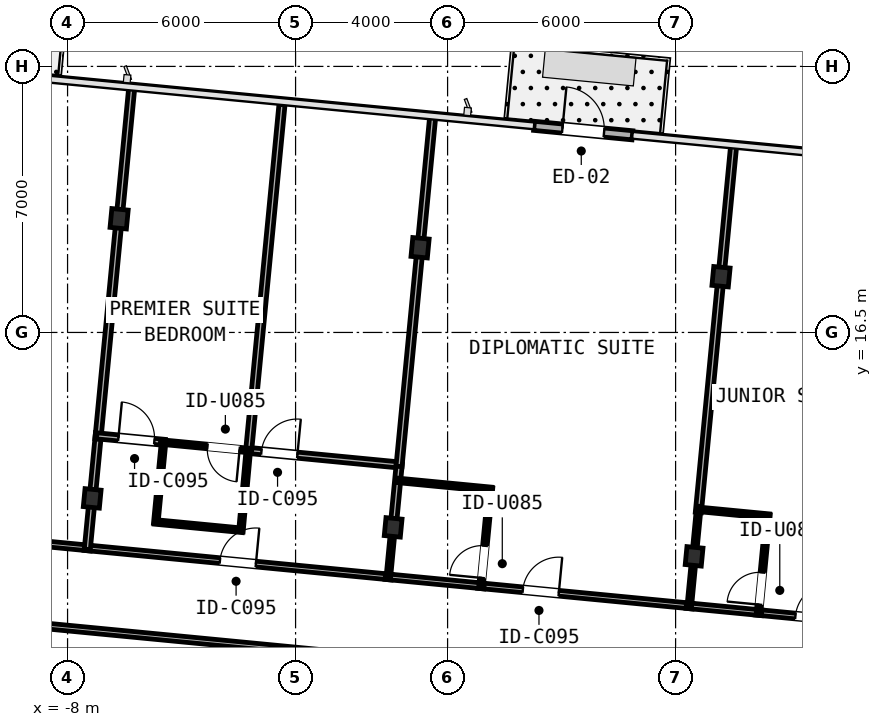
"""IFC4 building model, lengths in metres.
Left out: names, types, materials, properties, quantities, classifications, styles, units other than length and angle.
Written with IfcOpenShell. Run it as: python <this file> out.ifc"""

import sys

from ifc_helpers import new_model, si_unit, direction, frame, frame_2d, origin, origin_2d, place, context, subcontext, project, spatial, rectangle, i_section, extrude, element, fill, save


model = new_model("IFC4")
c1 = context("Model", 3, precision=1e-05, world=origin(), true_north=direction((0.0, 1.0)))
c2 = subcontext(c1, "Body", "Model", "MODEL_VIEW")
j1 = project(units=[si_unit("LENGTHUNIT", "METRE"), si_unit("PLANEANGLEUNIT", "RADIAN")], contexts=[c1])
p1 = place(None, origin())
s1 = spatial("IfcSite", under=j1, at=p1, CompositionType="ELEMENT")
p2 = place(p1, origin())
s2 = spatial("IfcBuilding", under=s1, at=p2, CompositionType="ELEMENT")
p3 = place(p2, frame((0.0, 0.0, 146.25)))
s3 = spatial("IfcBuildingStorey", under=s2, at=p3, CompositionType="ELEMENT", Elevation=146.25)
p4 = place(p3, frame((-7.352, 12.134, 0.0), z_axis=(0.0, 0.0, 1.0), x_axis=(0.995396198367, -0.09584575252, 0.0)))
e1 = element("IfcColumn", 1, at=p4, inside=s3, PredefinedType="COLUMN", context=c2, shape_type="SweptSolid", body=[
    extrude(i_section(OverallWidth=0.424, OverallDepth=0.474, WebThickness=0.048, FlangeThickness=0.077, FilletRadius=0.031, at=origin_2d()), origin(), (0.0, 0.0, 1.0), 3.45),
])
p5 = place(p3, frame((-6.643, 19.492, 0.0), z_axis=(0.0, 0.0, 1.0), x_axis=(0.995396198367, -0.09584575252, 0.0)))
e2 = element("IfcColumn", 2, at=p5, inside=s3, PredefinedType="COLUMN", context=c2, shape_type="SweptSolid", body=[
    extrude(i_section(OverallWidth=0.432, OverallDepth=0.498, WebThickness=0.056, FlangeThickness=0.089, FilletRadius=0.031, at=origin_2d()), origin(), (0.0, 0.0, 1.0), 3.45),
])
p6 = place(p3, frame((0.568, 11.371, 0.0), z_axis=(0.0, 0.0, 1.0), x_axis=(0.995396198367, -0.09584575252, 0.0)))
e3 = element("IfcColumn", 3, at=p6, inside=s3, PredefinedType="COLUMN", context=c2, shape_type="SweptSolid", body=[
    extrude(i_section(OverallWidth=0.424, OverallDepth=0.474, WebThickness=0.048, FlangeThickness=0.077, FilletRadius=0.031, at=origin_2d()), origin(), (0.0, 0.0, 1.0), 3.45),
])
p7 = place(p3, frame((1.276, 18.729, 0.0), z_axis=(0.0, 0.0, 1.0), x_axis=(0.995396198367, -0.09584575252, 0.0)))
e4 = element("IfcColumn", 4, at=p7, inside=s3, PredefinedType="COLUMN", context=c2, shape_type="SweptSolid", body=[
    extrude(i_section(OverallWidth=0.432, OverallDepth=0.498, WebThickness=0.056, FlangeThickness=0.089, FilletRadius=0.031, at=origin_2d()), origin(), (0.0, 0.0, 1.0), 3.45),
])
p8 = place(p3, frame((8.487, 10.609, 0.0), z_axis=(0.0, 0.0, 1.0), x_axis=(0.995396198367, -0.09584575252, 0.0)))
e5 = element("IfcColumn", 5, at=p8, inside=s3, PredefinedType="COLUMN", context=c2, shape_type="SweptSolid", body=[
    extrude(i_section(OverallWidth=0.424, OverallDepth=0.474, WebThickness=0.048, FlangeThickness=0.077, FilletRadius=0.031, at=origin_2d()), origin(), (0.0, 0.0, 1.0), 3.45),
])
p9 = place(p3, frame((9.195, 17.967, 0.0), z_axis=(0.0, 0.0, 1.0), x_axis=(0.995396198367, -0.09584575252, 0.0)))
e6 = element("IfcColumn", 6, at=p9, inside=s3, PredefinedType="COLUMN", context=c2, shape_type="SweptSolid", body=[
    extrude(i_section(OverallWidth=0.432, OverallDepth=0.498, WebThickness=0.056, FlangeThickness=0.089, FilletRadius=0.031, at=origin_2d()), origin(), (0.0, 0.0, 1.0), 3.45),
])
p10 = place(p3, frame((4.275, 21.937, 0.0), z_axis=(0.0, 0.0, 1.0), x_axis=(0.995394049959, -0.095868061976, 0.0)))
e7 = element("IfcWall", 7, at=p10, inside=s3, PredefinedType="STANDARD", context=c2, shape_type="SweptSolid", body=[
    extrude(rectangle(XDim=2.6, YDim=0.24, at=frame_2d((1.3, 0.0))), origin(), (0.0, 0.0, 1.0), 3.19),
])
p11 = place(p10, frame((0.75, 0.0, 0.0)))
e8 = element("IfcOpeningElement", 8, at=p11, cuts=e7, PredefinedType="OPENING", context=c2, shape_type="SweptSolid", body=[
    extrude(rectangle(XDim=1.1, YDim=2.15, at=frame_2d((0.55, 1.075))), frame((0.0, 0.13, 0.0), z_axis=(0.0, -1.0, 0.0), x_axis=(1.0, 0.0, 0.0)), (0.0, 0.0, 1.0), 0.26),
])
p12 = place(p3, frame((-13.04, 11.367, 0.0), z_axis=(0.0, 0.0, 1.0), x_axis=(0.995396240334, -0.095845316679, 0.0)))
e9 = element("IfcWall", 9, at=p12, inside=s3, PredefinedType="PARTITIONING", context=c2, shape_type="SweptSolid", body=[
    extrude(rectangle(XDim=5.67, YDim=0.15, at=frame_2d((2.835, 0.0))), origin(), (0.0, 0.0, 1.0), 2.479),
])
p13 = place(p12, frame((1.186, 0.0, 0.0)))
e10 = element("IfcOpeningElement", 10, at=p13, cuts=e9, PredefinedType="OPENING", context=c2, shape_type="SweptSolid", body=[
    extrude(rectangle(XDim=0.95, YDim=2.15, at=frame_2d((0.475, 1.075))), frame((0.0, 0.085, 0.0), z_axis=(0.0, -1.0, 0.0), x_axis=(1.0, 0.0, 0.0)), (0.0, 0.0, 1.0), 0.17),
])
p14 = place(p3, frame((-7.559, 10.84, 0.0), z_axis=(0.0, 0.0, 1.0), x_axis=(0.995395467524, -0.095853342309, 0.0)))
e11 = element("IfcWall", 11, at=p14, inside=s3, PredefinedType="PARTITIONING", context=c2, shape_type="SweptSolid", body=[
    extrude(rectangle(XDim=8.12, YDim=0.15, at=frame_2d((4.06, 0.0))), origin(), (0.0, 0.0, 1.0), 2.479),
])
p15 = place(p14, frame((3.585, 0.0, 0.0)))
e12 = element("IfcOpeningElement", 12, at=p15, cuts=e11, PredefinedType="OPENING", context=c2, shape_type="SweptSolid", body=[
    extrude(rectangle(XDim=0.95, YDim=2.15, at=frame_2d((0.475, 1.075))), frame((0.0, 0.085, 0.0), z_axis=(0.0, -1.0, 0.0), x_axis=(1.0, 0.0, 0.0)), (0.0, 0.0, 1.0), 0.17),
])
p16 = place(p3, frame((2.799, 9.842, 0.0), z_axis=(0.0, 0.0, 1.0), x_axis=(0.995395844771, -0.095849424686, 0.0)))
e13 = element("IfcWall", 13, at=p16, inside=s3, PredefinedType="PARTITIONING", context=c2, shape_type="SweptSolid", body=[
    extrude(rectangle(XDim=5.67, YDim=0.15, at=frame_2d((2.835, 0.0))), origin(), (0.0, 0.0, 1.0), 2.479),
])
p17 = place(p16, frame((1.186, 0.0, 0.0)))
e14 = element("IfcOpeningElement", 14, at=p17, cuts=e13, PredefinedType="OPENING", context=c2, shape_type="SweptSolid", body=[
    extrude(rectangle(XDim=0.95, YDim=2.15, at=frame_2d((0.475, 1.075))), frame((0.0, 0.085, 0.0), z_axis=(0.0, -1.0, 0.0), x_axis=(1.0, 0.0, 0.0)), (0.0, 0.0, 1.0), 0.17),
])
p18 = place(p3, frame((0.361, 10.077, 0.0), z_axis=(0.0, 0.0, 1.0), x_axis=(0.995397556197, -0.095831649869, 0.0)))
e15 = element("IfcWall", 15, at=p18, inside=s3, PredefinedType="PARTITIONING", context=c2, shape_type="SweptSolid", body=[
    extrude(rectangle(XDim=2.614, YDim=0.15, at=frame_2d((1.307, 0.0))), origin(), (0.0, 0.0, 1.0), 2.479),
])
p19 = place(p3, frame((10.101, 9.139, 0.0), z_axis=(0.0, 0.0, 1.0), x_axis=(0.995393345625, -0.095875374756, 0.0)))
e16 = element("IfcWall", 16, at=p19, inside=s3, PredefinedType="PARTITIONING", context=c2, shape_type="SweptSolid", body=[
    extrude(rectangle(XDim=2.312, YDim=0.15, at=frame_2d((1.156, 0.0))), origin(), (0.0, 0.0, 1.0), 2.718),
])
p20 = place(p19, frame((1.056, 0.0, 0.0)))
e17 = element("IfcOpeningElement", 17, at=p20, cuts=e16, PredefinedType="OPENING", context=c2, shape_type="SweptSolid", body=[
    extrude(rectangle(XDim=0.95, YDim=2.15, at=frame_2d((0.475, 1.075))), frame((0.0, 0.085, 0.0), z_axis=(0.0, -1.0, 0.0), x_axis=(1.0, 0.0, 0.0)), (0.0, 0.0, 1.0), 0.17),
])
p21 = place(p3, frame((8.28, 9.314, 0.0), z_axis=(0.0, 0.0, 1.0), x_axis=(0.995393086543, -0.095878064554, 0.0)))
e18 = element("IfcWall", 18, at=p21, inside=s3, PredefinedType="PARTITIONING", context=c2, shape_type="SweptSolid", body=[
    extrude(rectangle(XDim=1.994, YDim=0.15, at=frame_2d((0.997, 0.0))), origin(), (0.0, 0.0, 1.0), 2.479),
])
p22 = place(p3, frame((3.121, 7.651, 0.0), z_axis=(0.0, 0.0, 1.0), x_axis=(-0.995397135603, 0.095836018457, 0.0)))
e19 = element("IfcWall", 19, at=p22, inside=s3, PredefinedType="PARTITIONING", context=c2, shape_type="SweptSolid", body=[
    extrude(rectangle(XDim=18.892, YDim=0.15, at=frame_2d((9.446, 0.0))), origin(), (0.0, 0.0, 1.0), 2.479),
])
p23 = place(p22, frame((14.502, 0.0, 0.0)))
e20 = element("IfcOpeningElement", 20, at=p23, cuts=e19, PredefinedType="OPENING", context=c2, shape_type="SweptSolid", body=[
    extrude(rectangle(XDim=0.95, YDim=2.15, at=frame_2d((0.475, 1.075))), frame((0.0, 0.085, 0.0), z_axis=(0.0, -1.0, 0.0), x_axis=(1.0, 0.0, 0.0)), (0.0, 0.0, 1.0), 0.17),
])
p24 = place(p3, frame((-7.369, 11.958, 0.0), z_axis=(0.0, 0.0, 1.0), x_axis=(-0.095831494917, -0.995397571115, 0.0)))
e21 = element("IfcWall", 21, at=p24, inside=s3, PredefinedType="PARTITIONING", context=c2, shape_type="SweptSolid", body=[
    extrude(rectangle(XDim=1.172, YDim=0.16, at=frame_2d((0.586, 0.0))), origin(), (0.0, 0.0, 1.0), 2.479),
])
p25 = place(p3, frame((-7.186, 13.858, 0.0), z_axis=(0.0, 0.0, 1.0), x_axis=(-0.095867871334, -0.99539406832, 0.0)))
e22 = element("IfcWall", 22, at=p25, inside=s3, PredefinedType="PARTITIONING", context=c2, shape_type="SweptSolid", body=[
    extrude(rectangle(XDim=1.556, YDim=0.16, at=frame_2d((0.778, 0.0))), origin(), (0.0, 0.0, 1.0), 2.479),
])
p26 = place(p3, frame((-6.66, 19.316, 0.0), z_axis=(0.0, 0.0, 1.0), x_axis=(-0.095877964448, -0.995393096185, 0.0)))
e23 = element("IfcWall", 23, at=p26, inside=s3, PredefinedType="PARTITIONING", context=c2, shape_type="SweptSolid", body=[
    extrude(rectangle(XDim=5.648, YDim=0.16, at=frame_2d((2.824, 0.0))), origin(), (0.0, 0.0, 1.0), 2.479),
])
p27 = place(p3, frame((-6.306, 22.995, 0.0), z_axis=(0.0, 0.0, 1.0), x_axis=(-0.095859866796, -0.995394839216, 0.0)))
e24 = element("IfcWall", 24, at=p27, inside=s3, PredefinedType="PARTITIONING", context=c2, shape_type="SweptSolid", body=[
    extrude(rectangle(XDim=3.344, YDim=0.16, at=frame_2d((1.672, 0.0))), origin(), (0.0, 0.0, 1.0), 3.19),
])
p28 = place(p3, frame((-7.233, 13.78, 0.0), z_axis=(0.0, 0.0, 1.0), x_axis=(0.995392932756, -0.095879661139, 0.0)))
e25 = element("IfcWall", 25, at=p28, inside=s3, PredefinedType="PARTITIONING", context=c2, shape_type="SweptSolid", body=[
    extrude(rectangle(XDim=1.808, YDim=0.16, at=frame_2d((0.904, 0.0))), origin(), (0.0, 0.0, 1.0), 2.479),
])
p29 = place(p28, frame((0.574, 0.0, 0.0)))
e26 = element("IfcOpeningElement", 26, at=p29, cuts=e25, PredefinedType="OPENING", context=c2, shape_type="SweptSolid", body=[
    extrude(rectangle(XDim=0.95, YDim=2.15, at=frame_2d((0.475, 1.075))), frame((0.0, 0.09, 0.0), z_axis=(0.0, -1.0, 0.0), x_axis=(1.0, 0.0, 0.0)), (0.0, 0.0, 1.0), 0.18),
])
p30 = place(p3, frame((-3.284, 13.4, 0.0), z_axis=(0.0, 0.0, 1.0), x_axis=(0.995395934192, -0.095848496045, 0.0)))
e27 = element("IfcWall", 27, at=p30, inside=s3, PredefinedType="PARTITIONING", context=c2, shape_type="SweptSolid", body=[
    extrude(rectangle(XDim=4.068, YDim=0.16, at=frame_2d((2.034, 0.0))), origin(), (0.0, 0.0, 1.0), 2.479),
])
p31 = place(p30, frame((0.386, 0.0, 0.0)))
e28 = element("IfcOpeningElement", 28, at=p31, cuts=e27, PredefinedType="OPENING", context=c2, shape_type="SweptSolid", body=[
    extrude(rectangle(XDim=0.95, YDim=2.15, at=frame_2d((0.475, 1.075))), frame((0.0, 0.09, 0.0), z_axis=(0.0, -1.0, 0.0), x_axis=(1.0, 0.0, 0.0)), (0.0, 0.0, 1.0), 0.18),
])
p32 = place(p3, frame((-5.47, 13.65, 0.0), z_axis=(0.0, 0.0, 1.0), x_axis=(-0.095846349626, -0.995396140872, 0.0)))
e29 = element("IfcWall", 29, at=p32, inside=s3, PredefinedType="PARTITIONING", context=c2, shape_type="SweptSolid", body=[
    extrude(rectangle(XDim=2.188, YDim=0.12, at=frame_2d((1.094, 0.0))), origin(), (0.0, 0.0, 1.0), 2.479),
])
p33 = place(p3, frame((-5.716, 11.516, 0.0), z_axis=(0.0, 0.0, 1.0), x_axis=(0.995393658532, -0.095872126059, 0.0)))
e30 = element("IfcWall", 30, at=p33, inside=s3, PredefinedType="PARTITIONING", context=c2, shape_type="SweptSolid", body=[
    extrude(rectangle(XDim=2.33, YDim=0.12, at=frame_2d((1.165, 0.0))), origin(), (0.0, 0.0, 1.0), 2.718),
])
p34 = place(p3, frame((-3.44, 11.257, 0.0), z_axis=(0.0, 0.0, 1.0), x_axis=(0.091159469261, 0.995836307414, 0.0)))
e31 = element("IfcWall", 31, at=p34, inside=s3, PredefinedType="PARTITIONING", context=c2, shape_type="SweptSolid", body=[
    extrude(rectangle(XDim=2.188, YDim=0.12, at=frame_2d((1.094, 0.0))), origin(), (0.0, 0.0, 1.0), 2.479),
])
p35 = place(p3, frame((0.729, 13.053, 0.0), z_axis=(0.0, 0.0, 1.0), x_axis=(-0.095783075571, -0.995402231479, 0.0)))
e32 = element("IfcWall", 32, at=p35, inside=s3, PredefinedType="PARTITIONING", context=c2, shape_type="SweptSolid", body=[
    extrude(rectangle(XDim=1.514, YDim=0.16, at=frame_2d((0.757, 0.0))), origin(), (0.0, 0.0, 1.0), 2.479),
])
p36 = place(p3, frame((0.551, 11.196, 0.0), z_axis=(0.0, 0.0, 1.0), x_axis=(-0.096017994315, -0.995379598328, 0.0)))
e33 = element("IfcWall", 33, at=p36, inside=s3, PredefinedType="PARTITIONING", context=c2, shape_type="SweptSolid", body=[
    extrude(rectangle(XDim=1.172, YDim=0.12, at=frame_2d((0.586, 0.0))), origin(), (0.0, 0.0, 1.0), 2.479),
])
p37 = place(p3, frame((-2.358, 22.495, 0.0), z_axis=(0.0, 0.0, 1.0), x_axis=(-0.095827921947, -0.995397915095, 0.0)))
e34 = element("IfcWall", 34, at=p37, inside=s3, PredefinedType="PARTITIONING", context=c2, shape_type="SweptSolid", body=[
    extrude(rectangle(XDim=9.182, YDim=0.16, at=frame_2d((4.591, 0.0))), origin(), (0.0, 0.0, 1.0), 2.558),
])
p38 = place(p3, frame((-3.194, 13.391, 0.0), z_axis=(0.0, 0.0, 1.0), x_axis=(-0.995388451302, 0.095926174813, 0.0)))
e35 = element("IfcWall", 35, at=p38, inside=s3, PredefinedType="PARTITIONING", context=c2, shape_type="SweptSolid", body=[
    extrude(rectangle(XDim=2.372, YDim=0.12, at=frame_2d((1.186, 0.0))), origin(), (0.0, 0.0, 1.0), 2.718),
])
p39 = place(p38, frame((0.28, 0.0, 0.0)))
e36 = element("IfcOpeningElement", 36, at=p39, cuts=e35, PredefinedType="OPENING", context=c2, shape_type="SweptSolid", body=[
    extrude(rectangle(XDim=0.85, YDim=2.1, at=frame_2d((0.425, 1.05))), frame((0.0, 0.07, 0.0), z_axis=(0.0, -1.0, 0.0), x_axis=(1.0, 0.0, 0.0)), (0.0, 0.0, 1.0), 0.14),
])
p40 = place(p3, frame((1.259, 18.554, 0.0), z_axis=(0.0, 0.0, 1.0), x_axis=(-0.095807834241, -0.995399848753, 0.0)))
e37 = element("IfcWall", 37, at=p40, inside=s3, PredefinedType="PARTITIONING", context=c2, shape_type="SweptSolid", body=[
    extrude(rectangle(XDim=5.606, YDim=0.16, at=frame_2d((2.803, 0.0))), origin(), (0.0, 0.0, 1.0), 2.479),
])
p41 = place(p3, frame((1.613, 22.233, 0.0), z_axis=(0.0, 0.0, 1.0), x_axis=(-0.095787528641, -0.99540180297, 0.0)))
e38 = element("IfcWall", 38, at=p41, inside=s3, PredefinedType="PARTITIONING", context=c2, shape_type="SweptSolid", body=[
    extrude(rectangle(XDim=3.344, YDim=0.16, at=frame_2d((1.672, 0.0))), origin(), (0.0, 0.0, 1.0), 3.19),
])
p42 = place(p3, frame((2.877, 9.794, 0.0), z_axis=(0.0, 0.0, 1.0), x_axis=(0.095891053428, 0.995391835345, 0.0)))
e39 = element("IfcWall", 39, at=p42, inside=s3, PredefinedType="PARTITIONING", context=c2, shape_type="SweptSolid", body=[
    extrude(rectangle(XDim=2.63, YDim=0.12, at=frame_2d((1.315, 0.0))), origin(), (0.0, 0.0, 1.0), 2.479),
])
p43 = place(p42, frame((0.247, 0.0, 0.0)))
e40 = element("IfcOpeningElement", 40, at=p43, cuts=e39, PredefinedType="OPENING", context=c2, shape_type="SweptSolid", body=[
    extrude(rectangle(XDim=0.85, YDim=2.1, at=frame_2d((0.425, 1.05))), frame((0.0, 0.07, 0.0), z_axis=(0.0, -1.0, 0.0), x_axis=(1.0, 0.0, 0.0)), (0.0, 0.0, 1.0), 0.14),
])
p44 = place(p3, frame((3.165, 12.369, 0.0), z_axis=(0.0, 0.0, 1.0), x_axis=(-0.995389028655, 0.095920183663, 0.0)))
e41 = element("IfcWall", 41, at=p44, inside=s3, PredefinedType="PARTITIONING", context=c2, shape_type="SweptSolid", body=[
    extrude(rectangle(XDim=2.53, YDim=0.12, at=frame_2d((1.265, 0.0))), origin(), (0.0, 0.0, 1.0), 2.479),
])
p45 = place(p3, frame((9.178, 17.791, 0.0), z_axis=(0.0, 0.0, 1.0), x_axis=(-0.095826863488, -0.995398016993, 0.0)))
e42 = element("IfcWall", 42, at=p45, inside=s3, PredefinedType="PARTITIONING", context=c2, shape_type="SweptSolid", body=[
    extrude(rectangle(XDim=6.056, YDim=0.16, at=frame_2d((3.028, 0.0))), origin(), (0.0, 0.0, 1.0), 2.479),
])
p46 = place(p3, frame((9.533, 21.47, 0.0), z_axis=(0.0, 0.0, 1.0), x_axis=(-0.095859866796, -0.995394839216, 0.0)))
e43 = element("IfcWall", 43, at=p46, inside=s3, PredefinedType="PARTITIONING", context=c2, shape_type="SweptSolid", body=[
    extrude(rectangle(XDim=3.344, YDim=0.16, at=frame_2d((1.672, 0.0))), origin(), (0.0, 0.0, 1.0), 3.19),
])
p47 = place(p3, frame((8.47, 10.433, 0.0), z_axis=(0.0, 0.0, 1.0), x_axis=(-0.095831494917, -0.995397571115, 0.0)))
e44 = element("IfcWall", 44, at=p47, inside=s3, PredefinedType="PARTITIONING", context=c2, shape_type="SweptSolid", body=[
    extrude(rectangle(XDim=1.172, YDim=0.12, at=frame_2d((0.586, 0.0))), origin(), (0.0, 0.0, 1.0), 2.479),
])
p48 = place(p3, frame((8.614, 11.927, 0.0), z_axis=(0.0, 0.0, 1.0), x_axis=(-0.09590284245, -0.99539069958, 0.0)))
e45 = element("IfcWall", 45, at=p48, inside=s3, PredefinedType="PARTITIONING", context=c2, shape_type="SweptSolid", body=[
    extrude(rectangle(XDim=1.148, YDim=0.12, at=frame_2d((0.574, 0.0))), origin(), (0.0, 0.0, 1.0), 2.479),
])
p49 = place(p3, frame((10.179, 9.091, 0.0), z_axis=(0.0, 0.0, 1.0), x_axis=(0.095799078022, 0.995400691506, 0.0)))
e46 = element("IfcWall", 46, at=p49, inside=s3, PredefinedType="PARTITIONING", context=c2, shape_type="SweptSolid", body=[
    extrude(rectangle(XDim=2.63, YDim=0.12, at=frame_2d((1.315, 0.0))), origin(), (0.0, 0.0, 1.0), 2.479),
])
p50 = place(p49, frame((0.247, 0.0, 0.0)))
e47 = element("IfcOpeningElement", 47, at=p50, cuts=e46, PredefinedType="OPENING", context=c2, shape_type="SweptSolid", body=[
    extrude(rectangle(XDim=0.85, YDim=2.1, at=frame_2d((0.425, 1.05))), frame((0.0, 0.07, 0.0), z_axis=(0.0, -1.0, 0.0), x_axis=(1.0, 0.0, 0.0)), (0.0, 0.0, 1.0), 0.14),
])
p51 = place(p3, frame((10.467, 11.666, 0.0), z_axis=(0.0, 0.0, 1.0), x_axis=(-0.995405983929, 0.095744071139, 0.0)))
e48 = element("IfcWall", 48, at=p51, inside=s3, PredefinedType="PARTITIONING", context=c2, shape_type="SweptSolid", body=[
    extrude(rectangle(XDim=1.91, YDim=0.12, at=frame_2d((0.955, 0.0))), origin(), (0.0, 0.0, 1.0), 2.479),
])
p52 = place(p11, origin())
e49 = element("IfcDoor", 49, at=p52, inside=s3, OperationType="SINGLE_SWING_LEFT", PredefinedType="DOOR", context=c2, shape_type="SweptSolid", body=[
    extrude(rectangle(XDim=1.1, YDim=2.15, at=frame_2d((0.55, 1.075))), frame((0.0, 0.025, 0.0), z_axis=(0.0, -1.0, 0.0), x_axis=(1.0, 0.0, 0.0)), (0.0, 0.0, 1.0), 0.05),
])
fill(e8, e49)
p53 = place(p15, frame((0.95, 0.0, 0.0), z_axis=(0.0, 0.0, 1.0), x_axis=(-1.0, 0.0, 0.0)))
e50 = element("IfcDoor", 50, at=p53, inside=s3, OperationType="SINGLE_SWING_RIGHT", PredefinedType="DOOR", context=c2, shape_type="SweptSolid", body=[
    extrude(rectangle(XDim=0.95, YDim=2.15, at=frame_2d((0.475, 1.075))), frame((0.0, 0.025, 0.0), z_axis=(0.0, -1.0, 0.0), x_axis=(1.0, 0.0, 0.0)), (0.0, 0.0, 1.0), 0.05),
])
fill(e12, e50)
p54 = place(p29, origin())
e51 = element("IfcDoor", 51, at=p54, inside=s3, OperationType="SINGLE_SWING_LEFT", PredefinedType="DOOR", context=c2, shape_type="SweptSolid", body=[
    extrude(rectangle(XDim=0.95, YDim=2.15, at=frame_2d((0.475, 1.075))), frame((0.0, 0.025, 0.0), z_axis=(0.0, -1.0, 0.0), x_axis=(1.0, 0.0, 0.0)), (0.0, 0.0, 1.0), 0.05),
])
fill(e26, e51)
p55 = place(p31, origin())
e52 = element("IfcDoor", 52, at=p55, inside=s3, OperationType="SINGLE_SWING_RIGHT", PredefinedType="DOOR", context=c2, shape_type="SweptSolid", body=[
    extrude(rectangle(XDim=0.95, YDim=2.15, at=frame_2d((0.475, 1.075))), frame((0.0, 0.025, 0.0), z_axis=(0.0, -1.0, 0.0), x_axis=(1.0, 0.0, 0.0)), (0.0, 0.0, 1.0), 0.05),
])
fill(e28, e52)
p56 = place(p39, frame((0.85, 0.0, 0.0), z_axis=(0.0, 0.0, 1.0), x_axis=(-1.0, 0.0, 0.0)))
e53 = element("IfcDoor", 53, at=p56, inside=s3, OperationType="SINGLE_SWING_LEFT", PredefinedType="DOOR", context=c2, shape_type="SweptSolid", body=[
    extrude(rectangle(XDim=0.85, YDim=2.1, at=frame_2d((0.425, 1.05))), frame((0.0, 0.025, 0.0), z_axis=(0.0, -1.0, 0.0), x_axis=(1.0, 0.0, 0.0)), (0.0, 0.0, 1.0), 0.05),
])
fill(e36, e53)
p57 = place(p17, frame((0.95, 0.0, 0.0), z_axis=(0.0, 0.0, 1.0), x_axis=(-1.0, 0.0, 0.0)))
e54 = element("IfcDoor", 54, at=p57, inside=s3, OperationType="SINGLE_SWING_RIGHT", PredefinedType="DOOR", context=c2, shape_type="SweptSolid", body=[
    extrude(rectangle(XDim=0.95, YDim=2.15, at=frame_2d((0.475, 1.075))), frame((0.0, 0.025, 0.0), z_axis=(0.0, -1.0, 0.0), x_axis=(1.0, 0.0, 0.0)), (0.0, 0.0, 1.0), 0.05),
])
fill(e14, e54)
p58 = place(p43, frame((0.85, 0.0, 0.0), z_axis=(0.0, 0.0, 1.0), x_axis=(-1.0, 0.0, 0.0)))
e55 = element("IfcDoor", 55, at=p58, inside=s3, OperationType="SINGLE_SWING_LEFT", PredefinedType="DOOR", context=c2, shape_type="SweptSolid", body=[
    extrude(rectangle(XDim=0.85, YDim=2.1, at=frame_2d((0.425, 1.05))), frame((0.0, 0.025, 0.0), z_axis=(0.0, -1.0, 0.0), x_axis=(1.0, 0.0, 0.0)), (0.0, 0.0, 1.0), 0.05),
])
fill(e40, e55)
p59 = place(p20, frame((0.95, 0.0, 0.0), z_axis=(0.0, 0.0, 1.0), x_axis=(-1.0, 0.0, 0.0)))
e56 = element("IfcDoor", 56, at=p59, inside=s3, OperationType="SINGLE_SWING_RIGHT", PredefinedType="DOOR", context=c2, shape_type="SweptSolid", body=[
    extrude(rectangle(XDim=0.95, YDim=2.15, at=frame_2d((0.475, 1.075))), frame((0.0, 0.025, 0.0), z_axis=(0.0, -1.0, 0.0), x_axis=(1.0, 0.0, 0.0)), (0.0, 0.0, 1.0), 0.05),
])
fill(e17, e56)
p60 = place(p50, frame((0.85, 0.0, 0.0), z_axis=(0.0, 0.0, 1.0), x_axis=(-1.0, 0.0, 0.0)))
e57 = element("IfcDoor", 57, at=p60, inside=s3, OperationType="SINGLE_SWING_LEFT", PredefinedType="DOOR", context=c2, shape_type="SweptSolid", body=[
    extrude(rectangle(XDim=0.85, YDim=2.1, at=frame_2d((0.425, 1.05))), frame((0.0, 0.025, 0.0), z_axis=(0.0, -1.0, 0.0), x_axis=(1.0, 0.0, 0.0)), (0.0, 0.0, 1.0), 0.05),
])
fill(e47, e57)
save(model, sys.argv[1])
